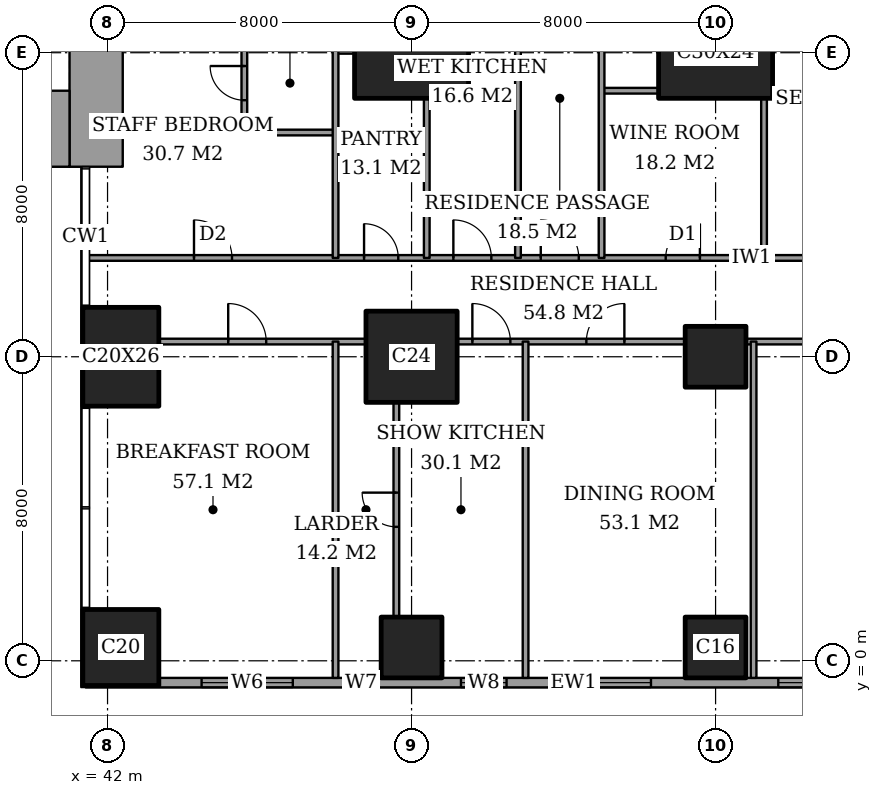
"""IFC4 building model, lengths in metres.
Left out: names, types, materials, properties, quantities, classifications, styles, units other than length and angle.
Written with IfcOpenShell. Run it as: python <this file> out.ifc"""

import sys

from ifc_helpers import new_model, si_unit, direction, frame, frame_2d, origin, origin_2d, place, context, subcontext, project, spatial, rectangle, extrude, element, fill, save


model = new_model("IFC4")
c1 = context("Model", 3, precision=1e-05, world=origin(), true_north=direction((0.0, 1.0)))
c2 = subcontext(c1, "Body", "Model", "MODEL_VIEW")
j1 = project(units=[si_unit("LENGTHUNIT", "METRE"), si_unit("PLANEANGLEUNIT", "RADIAN")], contexts=[c1])
p1 = place(None, origin())
s1 = spatial("IfcSite", under=j1, at=p1, CompositionType="ELEMENT")
p2 = place(p1, origin())
s2 = spatial("IfcBuilding", under=s1, at=p2, CompositionType="ELEMENT")
p3 = place(p2, frame((0.0, 0.0, 248.4)))
s3 = spatial("IfcBuildingStorey", under=s2, at=p3, CompositionType="ELEMENT", Elevation=248.4)
p4 = place(p3, frame((42.35, 0.35, 0.0), z_axis=(0.0, 0.0, 1.0), x_axis=(1.0, 0.0, 0.0)))
e1 = element("IfcColumn", 1, at=p4, inside=s3, PredefinedType="COLUMN", context=c2, shape_type="SweptSolid", body=[
    extrude(rectangle(XDim=2.0, YDim=2.0, at=origin_2d()), origin(), (0.0, 0.0, 1.0), 3.6),
])
p5 = place(p3, frame((42.35, 8.0, 0.0), z_axis=(0.0, 0.0, 1.0), x_axis=(1.0, 0.0, 0.0)))
e2 = element("IfcColumn", 2, at=p5, inside=s3, PredefinedType="COLUMN", context=c2, shape_type="SweptSolid", body=[
    extrude(rectangle(XDim=2.0, YDim=2.6, at=origin_2d()), origin(), (0.0, 0.0, 1.0), 3.6),
])
p6 = place(p3, frame((50.0, 0.35, 0.0), z_axis=(0.0, 0.0, 1.0), x_axis=(1.0, 0.0, 0.0)))
e3 = element("IfcColumn", 3, at=p6, inside=s3, PredefinedType="COLUMN", context=c2, shape_type="SweptSolid", body=[
    extrude(rectangle(XDim=1.6, YDim=1.6, at=origin_2d()), origin(), (0.0, 0.0, 1.0), 3.6),
])
p7 = place(p3, frame((50.0, 8.0, 0.0), z_axis=(0.0, 0.0, 1.0), x_axis=(1.0, 0.0, 0.0)))
e4 = element("IfcColumn", 4, at=p7, inside=s3, PredefinedType="COLUMN", context=c2, shape_type="SweptSolid", body=[
    extrude(rectangle(XDim=2.4, YDim=2.4, at=origin_2d()), origin(), (0.0, 0.0, 1.0), 3.6),
])
p8 = place(p3, frame((50.0, 16.0, 0.0), z_axis=(0.0, 0.0, 1.0), x_axis=(1.0, 0.0, 0.0)))
e5 = element("IfcColumn", 5, at=p8, inside=s3, PredefinedType="COLUMN", context=c2, shape_type="SweptSolid", body=[
    extrude(rectangle(XDim=3.0, YDim=2.4, at=origin_2d()), origin(), (0.0, 0.0, 1.0), 3.6),
])
for number, where, z_axis, x_axis in (
    (6, (58.0, 0.35, 0.0), (0.0, 0.0, 1.0), (1.0, 0.0, 0.0)),
    (7, (58.0, 8.0, 0.0), (0.0, 0.0, 1.0), (1.0, 0.0, 0.0)),
):
    element("IfcColumn", number, at=place(p3, frame(where, z_axis=z_axis, x_axis=x_axis)), inside=s3, PredefinedType="COLUMN", context=c2, shape_type="SweptSolid", body=[
        extrude(rectangle(XDim=1.6, YDim=1.6, at=origin_2d()), origin(), (0.0, 0.0, 1.0), 3.6),
    ])
p9 = place(p3, frame((58.0, 16.0, 0.0), z_axis=(0.0, 0.0, 1.0), x_axis=(1.0, 0.0, 0.0)))
e8 = element("IfcColumn", 8, at=p9, inside=s3, PredefinedType="COLUMN", context=c2, shape_type="SweptSolid", body=[
    extrude(rectangle(XDim=3.0, YDim=2.4, at=origin_2d()), origin(), (0.0, 0.0, 1.0), 3.6),
])
p10 = place(p3, frame((37.85, 14.0, 0.0), z_axis=(0.0, 0.0, 1.0), x_axis=(1.0, 0.0, 0.0)))
e9 = element("IfcWall", 9, at=p10, inside=s3, PredefinedType="SHEAR", context=c2, shape_type="SweptSolid", body=[
    extrude(rectangle(XDim=3.15, YDim=2.0, at=frame_2d((1.575, 0.0))), origin(), (0.0, 0.0, 1.0), 3.6),
])
p11 = place(p3, frame((41.7, 13.0, 0.0), z_axis=(0.0, 0.0, 1.0), x_axis=(0.0, 1.0, 0.0)))
e10 = element("IfcWall", 10, at=p11, inside=s3, PredefinedType="SHEAR", context=c2, shape_type="SweptSolid", body=[
    extrude(rectangle(XDim=11.85, YDim=1.4, at=frame_2d((5.925, 0.0))), origin(), (0.0, 0.0, 1.0), 3.6),
])
p12 = place(p11, frame((7.5, 0.0, 0.0)))
e11 = element("IfcOpeningElement", 11, at=p12, cuts=e10, PredefinedType="OPENING", context=c2, shape_type="SweptSolid", body=[
    extrude(rectangle(XDim=1.8, YDim=2.4, at=frame_2d((0.9, 1.2))), frame((0.0, 0.71, 0.0), z_axis=(0.0, -1.0, 0.0), x_axis=(1.0, 0.0, 0.0)), (0.0, 0.0, 1.0), 1.42),
])
p13 = place(p3, frame((41.425, -0.575, 0.0), z_axis=(0.0, 0.0, 1.0), x_axis=(1.0, 0.0, 0.0)))
e12 = element("IfcWall", 12, at=p13, inside=s3, PredefinedType="SOLIDWALL", context=c2, shape_type="SweptSolid", body=[
    extrude(rectangle(XDim=21.4, YDim=0.25, at=frame_2d((10.7, 0.0))), origin(), (0.0, 0.0, 1.0), 3.6),
])
p14 = place(p13, frame((3.05, 0.0, 0.6)))
e13 = element("IfcOpeningElement", 13, at=p14, cuts=e12, PredefinedType="OPENING", context=c2, shape_type="SweptSolid", body=[
    extrude(rectangle(XDim=2.4, YDim=2.0, at=frame_2d((1.2, 1.0))), frame((0.0, 0.135, 0.0), z_axis=(0.0, -1.0, 0.0), x_axis=(1.0, 0.0, 0.0)), (0.0, 0.0, 1.0), 0.27),
])
p15 = place(p13, frame((6.95, 0.0, 0.6)))
e14 = element("IfcOpeningElement", 14, at=p15, cuts=e12, PredefinedType="OPENING", context=c2, shape_type="SweptSolid", body=[
    extrude(rectangle(XDim=0.6, YDim=2.0, at=frame_2d((0.3, 1.0))), frame((0.0, 0.135, 0.0), z_axis=(0.0, -1.0, 0.0), x_axis=(1.0, 0.0, 0.0)), (0.0, 0.0, 1.0), 0.27),
])
p16 = place(p13, frame((9.875, 0.0, 0.6)))
e15 = element("IfcOpeningElement", 15, at=p16, cuts=e12, PredefinedType="OPENING", context=c2, shape_type="SweptSolid", body=[
    extrude(rectangle(XDim=1.2, YDim=2.0, at=frame_2d((0.6, 1.0))), frame((0.0, 0.135, 0.0), z_axis=(0.0, -1.0, 0.0), x_axis=(1.0, 0.0, 0.0)), (0.0, 0.0, 1.0), 0.27),
])
p17 = place(p13, frame((12.475, 0.0, 0.6)))
e16 = element("IfcOpeningElement", 16, at=p17, cuts=e12, PredefinedType="OPENING", context=c2, shape_type="SweptSolid", body=[
    extrude(rectangle(XDim=2.4, YDim=2.0, at=frame_2d((1.2, 1.0))), frame((0.0, 0.135, 0.0), z_axis=(0.0, -1.0, 0.0), x_axis=(1.0, 0.0, 0.0)), (0.0, 0.0, 1.0), 0.27),
])
p18 = place(p13, frame((18.225, 0.0, 0.6)))
e17 = element("IfcOpeningElement", 17, at=p18, cuts=e12, PredefinedType="OPENING", context=c2, shape_type="SweptSolid", body=[
    extrude(rectangle(XDim=2.4, YDim=2.0, at=frame_2d((1.2, 1.0))), frame((0.0, 0.135, 0.0), z_axis=(0.0, -1.0, 0.0), x_axis=(1.0, 0.0, 0.0)), (0.0, 0.0, 1.0), 0.27),
])
p19 = place(p3, frame((43.35, 8.4, 0.0), z_axis=(0.0, 0.0, 1.0), x_axis=(1.0, 0.0, 0.0)))
e18 = element("IfcWall", 18, at=p19, inside=s3, PredefinedType="PARTITIONING", context=c2, shape_type="SweptSolid", body=[
    extrude(rectangle(XDim=5.45, YDim=0.15, at=frame_2d((2.725, 0.0))), origin(), (0.0, 0.0, 1.0), 3.35),
])
p20 = place(p19, frame((1.825, 0.0, 0.0)))
e19 = element("IfcOpeningElement", 19, at=p20, cuts=e18, PredefinedType="OPENING", context=c2, shape_type="SweptSolid", body=[
    extrude(rectangle(XDim=1.0, YDim=2.1, at=frame_2d((0.5, 1.05))), frame((0.0, 0.085, 0.0), z_axis=(0.0, -1.0, 0.0), x_axis=(1.0, 0.0, 0.0)), (0.0, 0.0, 1.0), 0.17),
])
p21 = place(p3, frame((51.2, 8.4, 0.0), z_axis=(0.0, 0.0, 1.0), x_axis=(1.0, 0.0, 0.0)))
e20 = element("IfcWall", 20, at=p21, inside=s3, PredefinedType="PARTITIONING", context=c2, shape_type="SweptSolid", body=[
    extrude(rectangle(XDim=6.0, YDim=0.15, at=frame_2d((3.0, 0.0))), origin(), (0.0, 0.0, 1.0), 3.35),
])
p22 = place(p21, frame((3.4, 0.0, 0.0)))
e21 = element("IfcOpeningElement", 21, at=p22, cuts=e20, PredefinedType="OPENING", context=c2, shape_type="SweptSolid", body=[
    extrude(rectangle(XDim=1.0, YDim=2.1, at=frame_2d((0.5, 1.05))), frame((0.0, 0.085, 0.0), z_axis=(0.0, -1.0, 0.0), x_axis=(1.0, 0.0, 0.0)), (0.0, 0.0, 1.0), 0.17),
])
p23 = place(p21, frame((0.4, 0.0, 0.0)))
e22 = element("IfcOpeningElement", 22, at=p23, cuts=e20, PredefinedType="OPENING", context=c2, shape_type="SweptSolid", body=[
    extrude(rectangle(XDim=1.0, YDim=2.1, at=frame_2d((0.5, 1.05))), frame((0.0, 0.085, 0.0), z_axis=(0.0, -1.0, 0.0), x_axis=(1.0, 0.0, 0.0)), (0.0, 0.0, 1.0), 0.17),
])
p24 = place(p3, frame((58.8, 8.4, 0.0), z_axis=(0.0, 0.0, 1.0), x_axis=(1.0, 0.0, 0.0)))
e23 = element("IfcWall", 23, at=p24, inside=s3, PredefinedType="PARTITIONING", context=c2, shape_type="SweptSolid", body=[
    extrude(rectangle(XDim=6.05, YDim=0.15, at=frame_2d((3.025, 0.0))), origin(), (0.0, 0.0, 1.0), 3.35),
])
p25 = place(p24, frame((2.625, 0.0, 0.0)))
e24 = element("IfcOpeningElement", 24, at=p25, cuts=e23, PredefinedType="OPENING", context=c2, shape_type="SweptSolid", body=[
    extrude(rectangle(XDim=1.0, YDim=2.1, at=frame_2d((0.5, 1.05))), frame((0.0, 0.085, 0.0), z_axis=(0.0, -1.0, 0.0), x_axis=(1.0, 0.0, 0.0)), (0.0, 0.0, 1.0), 0.17),
])
p26 = place(p3, frame((41.439, 10.6, 0.0), z_axis=(0.0, 0.0, 1.0), x_axis=(1.0, 0.0, 0.0)))
e25 = element("IfcWall", 25, at=p26, inside=s3, PredefinedType="PARTITIONING", context=c2, shape_type="SweptSolid", body=[
    extrude(rectangle(XDim=25.011, YDim=0.15, at=frame_2d((12.505, 0.0))), origin(), (0.0, 0.0, 1.0), 3.35),
])
p27 = place(p26, frame((11.961, 0.0, 0.0)))
e26 = element("IfcOpeningElement", 26, at=p27, cuts=e25, PredefinedType="OPENING", context=c2, shape_type="SweptSolid", body=[
    extrude(rectangle(XDim=1.0, YDim=2.1, at=frame_2d((0.5, 1.05))), frame((0.0, 0.085, 0.0), z_axis=(0.0, -1.0, 0.0), x_axis=(1.0, 0.0, 0.0)), (0.0, 0.0, 1.0), 0.17),
])
p28 = place(p26, frame((20.924, 0.0, 0.0)))
e27 = element("IfcOpeningElement", 27, at=p28, cuts=e25, PredefinedType="OPENING", context=c2, shape_type="SweptSolid", body=[
    extrude(rectangle(XDim=1.0, YDim=2.1, at=frame_2d((0.5, 1.05))), frame((0.0, 0.085, 0.0), z_axis=(0.0, -1.0, 0.0), x_axis=(1.0, 0.0, 0.0)), (0.0, 0.0, 1.0), 0.17),
])
p29 = place(p26, frame((15.249, 0.0, 0.0)))
e28 = element("IfcOpeningElement", 28, at=p29, cuts=e25, PredefinedType="OPENING", context=c2, shape_type="SweptSolid", body=[
    extrude(rectangle(XDim=0.9, YDim=2.1, at=frame_2d((0.45, 1.05))), frame((0.0, 0.085, 0.0), z_axis=(0.0, -1.0, 0.0), x_axis=(1.0, 0.0, 0.0)), (0.0, 0.0, 1.0), 0.17),
])
p30 = place(p26, frame((9.661, 0.0, 0.0)))
e29 = element("IfcOpeningElement", 29, at=p30, cuts=e25, PredefinedType="OPENING", context=c2, shape_type="SweptSolid", body=[
    extrude(rectangle(XDim=1.0, YDim=2.1, at=frame_2d((0.5, 1.05))), frame((0.0, 0.085, 0.0), z_axis=(0.0, -1.0, 0.0), x_axis=(1.0, 0.0, 0.0)), (0.0, 0.0, 1.0), 0.17),
])
p31 = place(p26, frame((7.311, 0.0, 0.0)))
e30 = element("IfcOpeningElement", 30, at=p31, cuts=e25, PredefinedType="OPENING", context=c2, shape_type="SweptSolid", body=[
    extrude(rectangle(XDim=0.9, YDim=2.1, at=frame_2d((0.45, 1.05))), frame((0.0, 0.085, 0.0), z_axis=(0.0, -1.0, 0.0), x_axis=(1.0, 0.0, 0.0)), (0.0, 0.0, 1.0), 0.17),
])
p32 = place(p26, frame((2.836, 0.0, 0.0)))
e31 = element("IfcOpeningElement", 31, at=p32, cuts=e25, PredefinedType="OPENING", context=c2, shape_type="SweptSolid", body=[
    extrude(rectangle(XDim=1.0, YDim=2.1, at=frame_2d((0.5, 1.05))), frame((0.0, 0.085, 0.0), z_axis=(0.0, -1.0, 0.0), x_axis=(1.0, 0.0, 0.0)), (0.0, 0.0, 1.0), 0.17),
])
p33 = place(p3, frame((45.6, 13.9, 0.0), z_axis=(0.0, 0.0, 1.0), x_axis=(1.0, 0.0, 0.0)))
e32 = element("IfcWall", 32, at=p33, inside=s3, PredefinedType="PARTITIONING", context=c2, shape_type="SweptSolid", body=[
    extrude(rectangle(XDim=2.4, YDim=0.15, at=frame_2d((1.2, 0.0))), origin(), (0.0, 0.0, 1.0), 3.35),
])
p34 = place(p3, frame((55.0, 15.0, 0.0), z_axis=(0.0, 0.0, 1.0), x_axis=(1.0, 0.0, 0.0)))
e33 = element("IfcWall", 33, at=p34, inside=s3, PredefinedType="PARTITIONING", context=c2, shape_type="SweptSolid", body=[
    extrude(rectangle(XDim=1.5, YDim=0.15, at=frame_2d((0.75, 0.0))), origin(), (0.0, 0.0, 1.0), 3.35),
])
p35 = place(p3, frame((48.0, 16.05, 0.0), z_axis=(0.0, 0.0, 1.0), x_axis=(1.0, 0.0, 0.0)))
e34 = element("IfcWall", 34, at=p35, inside=s3, PredefinedType="PARTITIONING", context=c2, shape_type="SweptSolid", body=[
    extrude(rectangle(XDim=0.5, YDim=0.15, at=frame_2d((0.25, 0.0))), origin(), (0.0, 0.0, 1.0), 2.634),
])
p36 = place(p3, frame((45.6, 13.9, 0.0), z_axis=(0.0, 0.0, 1.0), x_axis=(0.0, 1.0, 0.0)))
e35 = element("IfcWall", 35, at=p36, inside=s3, PredefinedType="PARTITIONING", context=c2, shape_type="SweptSolid", body=[
    extrude(rectangle(XDim=2.6, YDim=0.15, at=frame_2d((1.3, 0.0))), origin(), (0.0, 0.0, 1.0), 3.35),
])
p37 = place(p36, frame((0.85, 0.0, 0.0)))
e36 = element("IfcOpeningElement", 36, at=p37, cuts=e35, PredefinedType="OPENING", context=c2, shape_type="SweptSolid", body=[
    extrude(rectangle(XDim=0.9, YDim=2.1, at=frame_2d((0.45, 1.05))), frame((0.0, 0.085, 0.0), z_axis=(0.0, -1.0, 0.0), x_axis=(1.0, 0.0, 0.0)), (0.0, 0.0, 1.0), 0.17),
])
p38 = place(p3, frame((48.0, -0.45, 0.0), z_axis=(0.0, 0.0, 1.0), x_axis=(0.0, 1.0, 0.0)))
e37 = element("IfcWall", 37, at=p38, inside=s3, PredefinedType="PARTITIONING", context=c2, shape_type="SweptSolid", body=[
    extrude(rectangle(XDim=8.85, YDim=0.15, at=frame_2d((4.425, 0.0))), origin(), (0.0, 0.0, 1.0), 3.35),
])
p39 = place(p3, frame((48.0, 10.6, 0.0), z_axis=(0.0, 0.0, 1.0), x_axis=(0.0, 1.0, 0.0)))
e38 = element("IfcWall", 38, at=p39, inside=s3, PredefinedType="PARTITIONING", context=c2, shape_type="SweptSolid", body=[
    extrude(rectangle(XDim=8.4, YDim=0.15, at=frame_2d((4.2, 0.0))), origin(), (0.0, 0.0, 1.0), 3.35),
])
p40 = place(p39, frame((6.7, 0.0, 0.0)))
e39 = element("IfcOpeningElement", 39, at=p40, cuts=e38, PredefinedType="OPENING", context=c2, shape_type="SweptSolid", body=[
    extrude(rectangle(XDim=0.9, YDim=2.1, at=frame_2d((0.45, 1.05))), frame((0.0, 0.085, 0.0), z_axis=(0.0, -1.0, 0.0), x_axis=(1.0, 0.0, 0.0)), (0.0, 0.0, 1.0), 0.17),
])
p41 = place(p3, frame((49.6, 1.15, 0.0), z_axis=(0.0, 0.0, 1.0), x_axis=(0.0, 1.0, 0.0)))
e40 = element("IfcWall", 40, at=p41, inside=s3, PredefinedType="PARTITIONING", context=c2, shape_type="SweptSolid", body=[
    extrude(rectangle(XDim=5.65, YDim=0.15, at=frame_2d((2.825, 0.0))), origin(), (0.0, 0.0, 1.0), 3.35),
])
p42 = place(p41, frame((2.375, 0.0, 0.0)))
e41 = element("IfcOpeningElement", 41, at=p42, cuts=e40, PredefinedType="OPENING", context=c2, shape_type="SweptSolid", body=[
    extrude(rectangle(XDim=0.9, YDim=2.1, at=frame_2d((0.45, 1.05))), frame((0.0, 0.085, 0.0), z_axis=(0.0, -1.0, 0.0), x_axis=(1.0, 0.0, 0.0)), (0.0, 0.0, 1.0), 0.17),
])
p43 = place(p3, frame((50.4, 10.6, 0.0), z_axis=(0.0, 0.0, 1.0), x_axis=(0.0, 1.0, 0.0)))
e42 = element("IfcWall", 42, at=p43, inside=s3, PredefinedType="PARTITIONING", context=c2, shape_type="SweptSolid", body=[
    extrude(rectangle(XDim=4.2, YDim=0.15, at=frame_2d((2.1, 0.0))), origin(), (0.0, 0.0, 1.0), 3.35),
])
p44 = place(p3, frame((52.8, 10.6, 0.0), z_axis=(0.0, 0.0, 1.0), x_axis=(0.0, 1.0, 0.0)))
e43 = element("IfcWall", 43, at=p44, inside=s3, PredefinedType="PARTITIONING", context=c2, shape_type="SweptSolid", body=[
    extrude(rectangle(XDim=8.4, YDim=0.15, at=frame_2d((4.2, 0.0))), origin(), (0.0, 0.0, 1.0), 3.35),
])
p45 = place(p3, frame((53.0, -0.45, 0.0), z_axis=(0.0, 0.0, 1.0), x_axis=(0.0, 1.0, 0.0)))
e44 = element("IfcWall", 44, at=p45, inside=s3, PredefinedType="PARTITIONING", context=c2, shape_type="SweptSolid", body=[
    extrude(rectangle(XDim=8.85, YDim=0.15, at=frame_2d((4.425, 0.0))), origin(), (0.0, 0.0, 1.0), 3.35),
])
p46 = place(p3, frame((55.0, 10.6, 0.0), z_axis=(0.0, 0.0, 1.0), x_axis=(0.0, 1.0, 0.0)))
e45 = element("IfcWall", 45, at=p46, inside=s3, PredefinedType="PARTITIONING", context=c2, shape_type="SweptSolid", body=[
    extrude(rectangle(XDim=11.0, YDim=0.15, at=frame_2d((5.5, 0.0))), origin(), (0.0, 0.0, 1.0), 3.35),
])
p47 = place(p46, frame((9.2, 0.0, 0.0)))
e46 = element("IfcOpeningElement", 46, at=p47, cuts=e45, PredefinedType="OPENING", context=c2, shape_type="SweptSolid", body=[
    extrude(rectangle(XDim=1.0, YDim=2.1, at=frame_2d((0.5, 1.05))), frame((0.0, 0.085, 0.0), z_axis=(0.0, -1.0, 0.0), x_axis=(1.0, 0.0, 0.0)), (0.0, 0.0, 1.0), 0.17),
])
p48 = place(p3, frame((59.0, -0.45, 0.0), z_axis=(0.0, 0.0, 1.0), x_axis=(0.0, 1.0, 0.0)))
e47 = element("IfcWall", 47, at=p48, inside=s3, PredefinedType="PARTITIONING", context=c2, shape_type="SweptSolid", body=[
    extrude(rectangle(XDim=8.85, YDim=0.15, at=frame_2d((4.425, 0.0))), origin(), (0.0, 0.0, 1.0), 3.35),
])
p49 = place(p3, frame((59.275, 10.6, 0.0), z_axis=(0.0, 0.0, 1.0), x_axis=(0.0, 1.0, 0.0)))
e48 = element("IfcWall", 48, at=p49, inside=s3, PredefinedType="PARTITIONING", context=c2, shape_type="SweptSolid", body=[
    extrude(rectangle(XDim=4.2, YDim=0.15, at=frame_2d((2.1, 0.0))), origin(), (0.0, 0.0, 1.0), 3.35),
])
p50 = place(p14, origin())
e49 = element("IfcWindow", 49, at=p50, inside=s3, PartitioningType="SINGLE_PANEL", PredefinedType="WINDOW", context=c2, shape_type="SweptSolid", body=[
    extrude(rectangle(XDim=2.4, YDim=2.0, at=frame_2d((1.2, 1.0))), frame((0.0, 0.03, 0.0), z_axis=(0.0, -1.0, 0.0), x_axis=(1.0, 0.0, 0.0)), (0.0, 0.0, 1.0), 0.06),
])
fill(e13, e49)
p51 = place(p15, origin())
e50 = element("IfcWindow", 50, at=p51, inside=s3, PartitioningType="SINGLE_PANEL", PredefinedType="WINDOW", context=c2, shape_type="SweptSolid", body=[
    extrude(rectangle(XDim=0.6, YDim=2.0, at=frame_2d((0.3, 1.0))), frame((0.0, 0.03, 0.0), z_axis=(0.0, -1.0, 0.0), x_axis=(1.0, 0.0, 0.0)), (0.0, 0.0, 1.0), 0.06),
])
fill(e14, e50)
p52 = place(p16, origin())
e51 = element("IfcWindow", 51, at=p52, inside=s3, PartitioningType="SINGLE_PANEL", PredefinedType="WINDOW", context=c2, shape_type="SweptSolid", body=[
    extrude(rectangle(XDim=1.2, YDim=2.0, at=frame_2d((0.6, 1.0))), frame((0.0, 0.03, 0.0), z_axis=(0.0, -1.0, 0.0), x_axis=(1.0, 0.0, 0.0)), (0.0, 0.0, 1.0), 0.06),
])
fill(e15, e51)
p53 = place(p17, origin())
e52 = element("IfcWindow", 52, at=p53, inside=s3, PartitioningType="SINGLE_PANEL", PredefinedType="WINDOW", context=c2, shape_type="SweptSolid", body=[
    extrude(rectangle(XDim=2.4, YDim=2.0, at=frame_2d((1.2, 1.0))), frame((0.0, 0.03, 0.0), z_axis=(0.0, -1.0, 0.0), x_axis=(1.0, 0.0, 0.0)), (0.0, 0.0, 1.0), 0.06),
])
fill(e16, e52)
p54 = place(p18, origin())
e53 = element("IfcWindow", 53, at=p54, inside=s3, PartitioningType="SINGLE_PANEL", PredefinedType="WINDOW", context=c2, shape_type="SweptSolid", body=[
    extrude(rectangle(XDim=2.4, YDim=2.0, at=frame_2d((1.2, 1.0))), frame((0.0, 0.03, 0.0), z_axis=(0.0, -1.0, 0.0), x_axis=(1.0, 0.0, 0.0)), (0.0, 0.0, 1.0), 0.06),
])
fill(e17, e53)
p55 = place(p22, origin())
e54 = element("IfcDoor", 54, at=p55, inside=s3, OperationType="SINGLE_SWING_LEFT", PredefinedType="DOOR", context=c2, shape_type="SweptSolid", body=[
    extrude(rectangle(XDim=1.0, YDim=2.1, at=frame_2d((0.5, 1.05))), frame((0.0, 0.025, 0.0), z_axis=(0.0, -1.0, 0.0), x_axis=(1.0, 0.0, 0.0)), (0.0, 0.0, 1.0), 0.05),
])
fill(e21, e54)
p56 = place(p23, origin())
e55 = element("IfcDoor", 55, at=p56, inside=s3, OperationType="SINGLE_SWING_RIGHT", PredefinedType="DOOR", context=c2, shape_type="SweptSolid", body=[
    extrude(rectangle(XDim=1.0, YDim=2.1, at=frame_2d((0.5, 1.05))), frame((0.0, 0.025, 0.0), z_axis=(0.0, -1.0, 0.0), x_axis=(1.0, 0.0, 0.0)), (0.0, 0.0, 1.0), 0.05),
])
fill(e22, e55)
p57 = place(p42, origin())
e56 = element("IfcDoor", 56, at=p57, inside=s3, OperationType="SINGLE_SWING_LEFT", PredefinedType="DOOR", context=c2, shape_type="SweptSolid", body=[
    extrude(rectangle(XDim=0.9, YDim=2.1, at=frame_2d((0.45, 1.05))), frame((0.0, 0.025, 0.0), z_axis=(0.0, -1.0, 0.0), x_axis=(1.0, 0.0, 0.0)), (0.0, 0.0, 1.0), 0.05),
])
fill(e41, e56)
p58 = place(p20, origin())
e57 = element("IfcDoor", 57, at=p58, inside=s3, OperationType="SINGLE_SWING_RIGHT", PredefinedType="DOOR", context=c2, shape_type="SweptSolid", body=[
    extrude(rectangle(XDim=1.0, YDim=2.1, at=frame_2d((0.5, 1.05))), frame((0.0, 0.025, 0.0), z_axis=(0.0, -1.0, 0.0), x_axis=(1.0, 0.0, 0.0)), (0.0, 0.0, 1.0), 0.05),
])
fill(e19, e57)
p59 = place(p27, origin())
e58 = element("IfcDoor", 58, at=p59, inside=s3, OperationType="SINGLE_SWING_RIGHT", PredefinedType="DOOR", context=c2, shape_type="SweptSolid", body=[
    extrude(rectangle(XDim=1.0, YDim=2.1, at=frame_2d((0.5, 1.05))), frame((0.0, 0.025, 0.0), z_axis=(0.0, -1.0, 0.0), x_axis=(1.0, 0.0, 0.0)), (0.0, 0.0, 1.0), 0.05),
])
fill(e26, e58)
p60 = place(p29, origin())
e59 = element("IfcDoor", 59, at=p60, inside=s3, OperationType="SINGLE_SWING_LEFT", PredefinedType="DOOR", context=c2, shape_type="SweptSolid", body=[
    extrude(rectangle(XDim=0.9, YDim=2.1, at=frame_2d((0.45, 1.05))), frame((0.0, 0.025, 0.0), z_axis=(0.0, -1.0, 0.0), x_axis=(1.0, 0.0, 0.0)), (0.0, 0.0, 1.0), 0.05),
])
fill(e28, e59)
p61 = place(p30, origin())
e60 = element("IfcDoor", 60, at=p61, inside=s3, OperationType="SINGLE_SWING_RIGHT", PredefinedType="DOOR", context=c2, shape_type="SweptSolid", body=[
    extrude(rectangle(XDim=1.0, YDim=2.1, at=frame_2d((0.5, 1.05))), frame((0.0, 0.025, 0.0), z_axis=(0.0, -1.0, 0.0), x_axis=(1.0, 0.0, 0.0)), (0.0, 0.0, 1.0), 0.05),
])
fill(e29, e60)
p62 = place(p31, origin())
e61 = element("IfcDoor", 61, at=p62, inside=s3, OperationType="SINGLE_SWING_RIGHT", PredefinedType="DOOR", context=c2, shape_type="SweptSolid", body=[
    extrude(rectangle(XDim=0.9, YDim=2.1, at=frame_2d((0.45, 1.05))), frame((0.0, 0.025, 0.0), z_axis=(0.0, -1.0, 0.0), x_axis=(1.0, 0.0, 0.0)), (0.0, 0.0, 1.0), 0.05),
])
fill(e30, e61)
p63 = place(p37, origin())
e62 = element("IfcDoor", 62, at=p63, inside=s3, OperationType="SINGLE_SWING_LEFT", PredefinedType="DOOR", context=c2, shape_type="SweptSolid", body=[
    extrude(rectangle(XDim=0.9, YDim=2.1, at=frame_2d((0.45, 1.05))), frame((0.0, 0.025, 0.0), z_axis=(0.0, -1.0, 0.0), x_axis=(1.0, 0.0, 0.0)), (0.0, 0.0, 1.0), 0.05),
])
fill(e36, e62)
p64 = place(p32, origin())
e63 = element("IfcDoor", 63, at=p64, inside=s3, OperationType="SINGLE_SWING_RIGHT", PredefinedType="DOOR", context=c2, shape_type="SweptSolid", body=[
    extrude(rectangle(XDim=1.0, YDim=2.1, at=frame_2d((0.5, 1.05))), frame((0.0, 0.025, 0.0), z_axis=(0.0, -1.0, 0.0), x_axis=(1.0, 0.0, 0.0)), (0.0, 0.0, 1.0), 0.05),
])
fill(e31, e63)
save(model, sys.argv[1])
